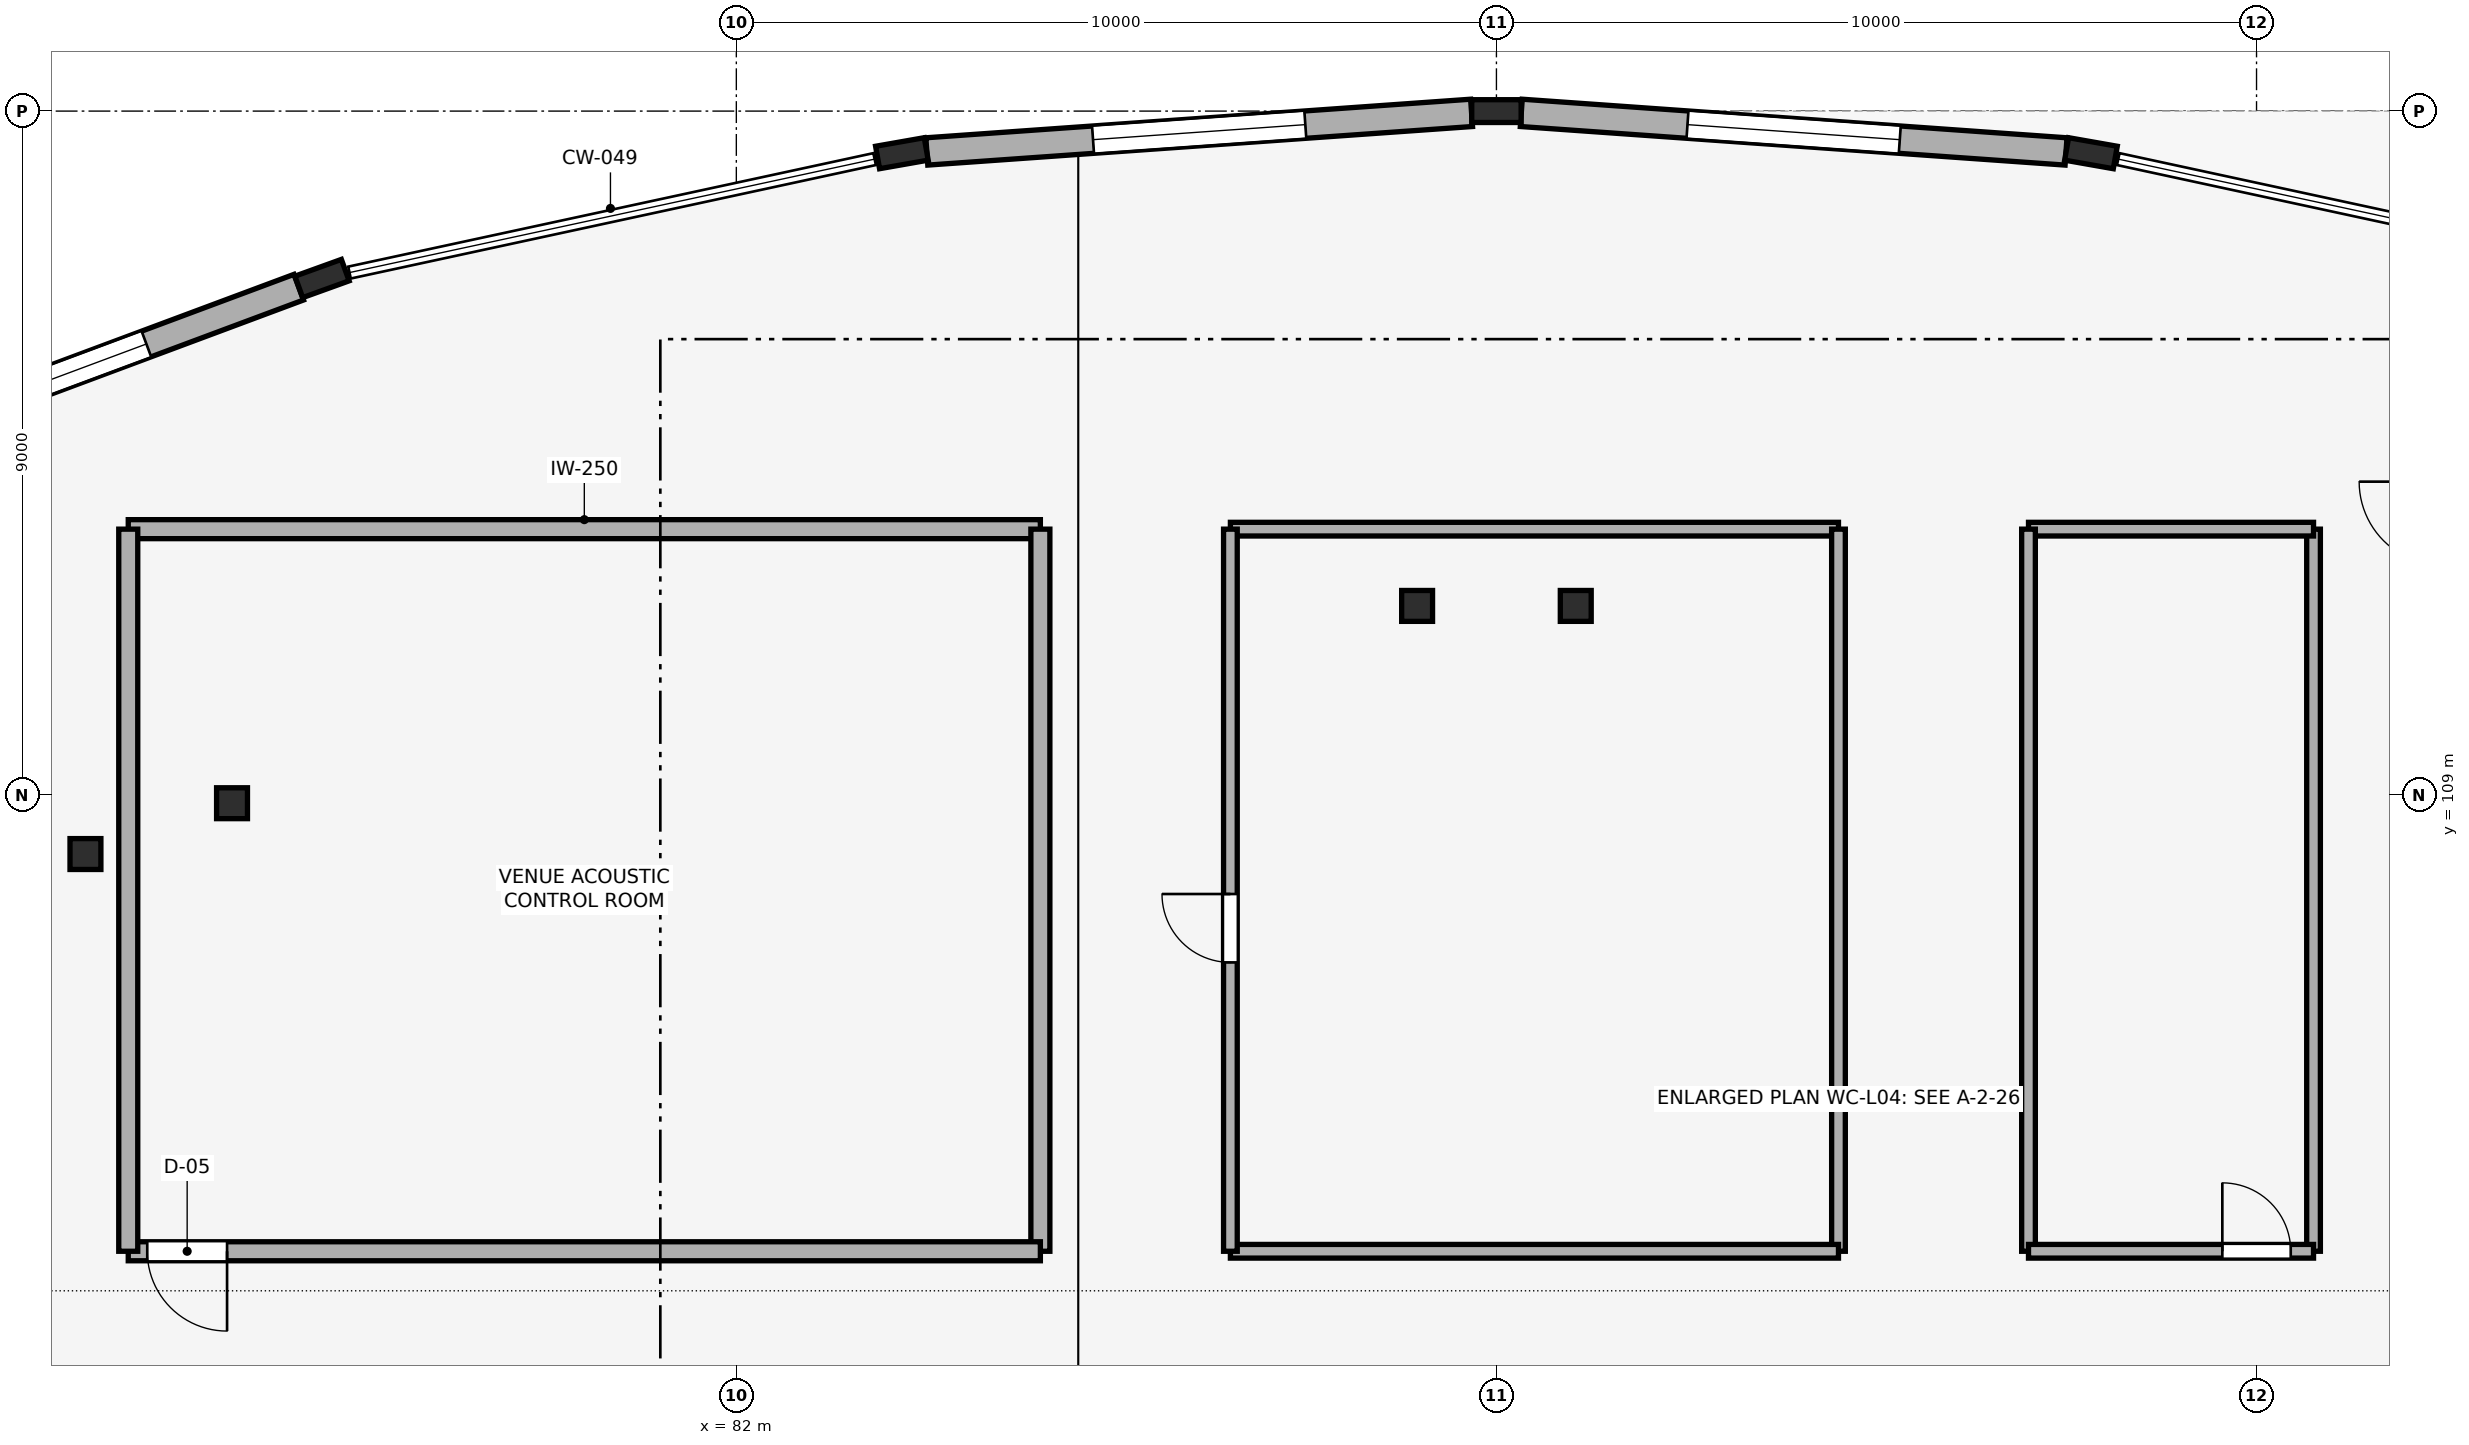
"""IFC4 building model, lengths in metres.
Left out: names, types, materials, properties, quantities, classifications, styles, units other than length and angle.
Written with IfcOpenShell. Run it as: python <this file> out.ifc"""

import sys

from ifc_helpers import new_model, si_unit, direction, frame, frame_2d, origin, origin_2d, place, context, subcontext, project, spatial, rectangle, hollow_circle, i_section, extrude, element, fill, save


model = new_model("IFC4")
c1 = context("Model", 3, precision=1e-05, world=origin(), true_north=direction((0.0, 1.0)))
c2 = subcontext(c1, "Body", "Model", "MODEL_VIEW")
j1 = project(units=[si_unit("LENGTHUNIT", "METRE"), si_unit("PLANEANGLEUNIT", "RADIAN")], contexts=[c1])
p1 = place(None, origin())
s1 = spatial("IfcSite", under=j1, at=p1, CompositionType="ELEMENT")
p2 = place(p1, origin())
s2 = spatial("IfcBuilding", under=s1, at=p2, CompositionType="ELEMENT")
p3 = place(p2, frame((0.0, 0.0, 19.5)))
s3 = spatial("IfcBuildingStorey", under=s2, at=p3, CompositionType="ELEMENT", Elevation=19.5)
for number, where, z_axis, x_axis in (
    (1, (99.822, 117.446, 0.0), (0.0, 0.0, 1.0), (0.173, 0.985, 0.0)),
    (2, (92.0, 118.0, 0.0), (0.0, 0.0, 1.0), (0.0, 1.0, 0.0)),
    (3, (84.178, 117.446, 0.0), (0.0, 0.0, 1.0), (-0.173, 0.985, 0.0)),
    (4, (76.549, 115.798, 0.0), (0.0, 0.0, 1.0), (-0.34, 0.941, 0.0)),
):
    element("IfcColumn", number, at=place(p3, frame(where, z_axis=z_axis, x_axis=x_axis)), inside=s3, PredefinedType="COLUMN", context=c2, shape_type="SweptSolid", body=[
        extrude(i_section(OverallWidth=0.3, OverallDepth=0.65, WebThickness=0.016, FlangeThickness=0.031, FilletRadius=0.027, at=origin_2d()), origin(), (0.0, 0.0, 1.0), 4.5),
    ])
for number, where, z_axis, x_axis in (
    (5, (93.044, 111.49, 0.0), (0.0, 0.0, 1.0), (1.0, 0.0, 0.0)),
    (6, (90.956, 111.49, 0.0), (0.0, 0.0, 1.0), (1.0, 0.0, 0.0)),
    (7, (75.365, 108.895, 0.0), (0.0, 0.0, 1.0), (1.0, 0.0, 0.0)),
    (8, (73.437, 108.226, 0.0), (0.0, 0.0, 1.0), (1.0, 0.0, 0.0)),
):
    element("IfcColumn", number, at=place(p3, frame(where, z_axis=z_axis, x_axis=x_axis)), inside=s3, PredefinedType="COLUMN", context=c2, shape_type="SweptSolid", body=[
        extrude(hollow_circle(Radius=0.203, WallThickness=0.016, at=origin_2d()), origin(), (0.0, 0.0, 1.0), 4.5),
    ])
p4 = place(p3, frame((69.611, 113.211, 0.0), z_axis=(0.0, 0.0, 1.0), x_axis=(0.937006422161, 0.349312130949, 0.0)))
e9 = element("IfcWall", 9, at=p4, inside=s3, PredefinedType="STANDARD", context=c2, shape_type="SweptSolid", body=[
    extrude(rectangle(XDim=7.078, YDim=0.36, at=frame_2d((3.539, 0.0))), origin(), (0.0, 0.0, 1.0), 3.562),
])
p5 = place(p4, frame((2.139, 0.0, 0.9)))
e10 = element("IfcOpeningElement", 10, at=p5, cuts=e9, PredefinedType="OPENING", context=c2, shape_type="SweptSolid", body=[
    extrude(rectangle(XDim=2.8, YDim=1.9, at=frame_2d((1.4, 0.95))), frame((0.0, 0.19, 0.0), z_axis=(0.0, -1.0, 0.0), x_axis=(1.0, 0.0, 0.0)), (0.0, 0.0, 1.0), 0.38),
])
p6 = place(p3, frame((84.506, 117.469, 0.0), z_axis=(0.0, 0.0, 1.0), x_axis=(0.99750163831, 0.070643340579, 0.0)))
e11 = element("IfcWall", 11, at=p6, inside=s3, PredefinedType="STANDARD", context=c2, shape_type="SweptSolid", body=[
    extrude(rectangle(XDim=7.185, YDim=0.36, at=frame_2d((3.593, 0.0))), origin(), (0.0, 0.0, 1.0), 3.562),
])
p7 = place(p6, frame((2.192, 0.0, 0.9)))
e12 = element("IfcOpeningElement", 12, at=p7, cuts=e11, PredefinedType="OPENING", context=c2, shape_type="SweptSolid", body=[
    extrude(rectangle(XDim=2.8, YDim=1.9, at=frame_2d((1.4, 0.95))), frame((0.0, 0.19, 0.0), z_axis=(0.0, -1.0, 0.0), x_axis=(1.0, 0.0, 0.0)), (0.0, 0.0, 1.0), 0.38),
])
p8 = place(p3, frame((92.327, 117.977, 0.0), z_axis=(0.0, 0.0, 1.0), x_axis=(0.99750163831, -0.070643340579, 0.0)))
e13 = element("IfcWall", 13, at=p8, inside=s3, PredefinedType="STANDARD", context=c2, shape_type="SweptSolid", body=[
    extrude(rectangle(XDim=7.185, YDim=0.36, at=frame_2d((3.593, 0.0))), origin(), (0.0, 0.0, 1.0), 3.562),
])
p9 = place(p8, frame((2.192, 0.0, 0.9)))
e14 = element("IfcOpeningElement", 14, at=p9, cuts=e13, PredefinedType="OPENING", context=c2, shape_type="SweptSolid", body=[
    extrude(rectangle(XDim=2.8, YDim=1.9, at=frame_2d((1.4, 0.95))), frame((0.0, 0.19, 0.0), z_axis=(0.0, -1.0, 0.0), x_axis=(1.0, 0.0, 0.0)), (0.0, 0.0, 1.0), 0.38),
])
p10 = place(p3, frame((74.0, 112.5, 0.0), z_axis=(0.0, 0.0, 1.0), x_axis=(1.0, 0.0, 0.0)))
e15 = element("IfcWall", 15, at=p10, inside=s3, PredefinedType="STANDARD", context=c2, shape_type="SweptSolid", body=[
    extrude(rectangle(XDim=12.0, YDim=0.25, at=frame_2d((6.0, 0.0))), origin(), (0.0, 0.0, 1.0), 4.25),
])
p11 = place(p3, frame((86.0, 112.5, 0.0), z_axis=(0.0, 0.0, 1.0), x_axis=(0.0, -1.0, 0.0)))
e16 = element("IfcWall", 16, at=p11, inside=s3, PredefinedType="STANDARD", context=c2, shape_type="SweptSolid", body=[
    extrude(rectangle(XDim=9.5, YDim=0.25, at=frame_2d((4.75, 0.0))), origin(), (0.0, 0.0, 1.0), 4.25),
])
p12 = place(p3, frame((86.0, 103.0, 0.0), z_axis=(0.0, 0.0, 1.0), x_axis=(-1.0, 0.0, 0.0)))
e17 = element("IfcWall", 17, at=p12, inside=s3, PredefinedType="STANDARD", context=c2, shape_type="SweptSolid", body=[
    extrude(rectangle(XDim=12.0, YDim=0.25, at=frame_2d((6.0, 0.0))), origin(), (0.0, 0.0, 1.0), 4.25),
])
p13 = place(p12, frame((10.7, 0.0, 0.0)))
e18 = element("IfcOpeningElement", 18, at=p13, cuts=e17, PredefinedType="OPENING", context=c2, shape_type="SweptSolid", body=[
    extrude(rectangle(XDim=1.05, YDim=2.15, at=frame_2d((0.525, 1.075))), frame((0.0, 0.135, 0.0), z_axis=(0.0, -1.0, 0.0), x_axis=(1.0, 0.0, 0.0)), (0.0, 0.0, 1.0), 0.27),
])
p14 = place(p3, frame((74.0, 103.0, 0.0), z_axis=(0.0, 0.0, 1.0), x_axis=(0.0, 1.0, 0.0)))
e19 = element("IfcWall", 19, at=p14, inside=s3, PredefinedType="STANDARD", context=c2, shape_type="SweptSolid", body=[
    extrude(rectangle(XDim=9.5, YDim=0.25, at=frame_2d((4.75, 0.0))), origin(), (0.0, 0.0, 1.0), 4.25),
])
p15 = place(p3, frame((88.5, 112.5, 0.0), z_axis=(0.0, 0.0, 1.0), x_axis=(1.0, 0.0, 0.0)))
e20 = element("IfcWall", 20, at=p15, inside=s3, PredefinedType="PARTITIONING", context=c2, shape_type="SweptSolid", body=[
    extrude(rectangle(XDim=8.0, YDim=0.18, at=frame_2d((4.0, 0.0))), origin(), (0.0, 0.0, 1.0), 4.25),
])
p16 = place(p3, frame((96.5, 112.5, 0.0), z_axis=(0.0, 0.0, 1.0), x_axis=(0.0, -1.0, 0.0)))
e21 = element("IfcWall", 21, at=p16, inside=s3, PredefinedType="PARTITIONING", context=c2, shape_type="SweptSolid", body=[
    extrude(rectangle(XDim=9.5, YDim=0.18, at=frame_2d((4.75, 0.0))), origin(), (0.0, 0.0, 1.0), 4.25),
])
p17 = place(p3, frame((96.5, 103.0, 0.0), z_axis=(0.0, 0.0, 1.0), x_axis=(-1.0, 0.0, 0.0)))
e22 = element("IfcWall", 22, at=p17, inside=s3, PredefinedType="PARTITIONING", context=c2, shape_type="SweptSolid", body=[
    extrude(rectangle(XDim=8.0, YDim=0.18, at=frame_2d((4.0, 0.0))), origin(), (0.0, 0.0, 1.0), 4.25),
])
p18 = place(p3, frame((88.5, 103.0, 0.0), z_axis=(0.0, 0.0, 1.0), x_axis=(0.0, 1.0, 0.0)))
e23 = element("IfcWall", 23, at=p18, inside=s3, PredefinedType="PARTITIONING", context=c2, shape_type="SweptSolid", body=[
    extrude(rectangle(XDim=9.5, YDim=0.18, at=frame_2d((4.75, 0.0))), origin(), (0.0, 0.0, 1.0), 4.25),
])
p19 = place(p18, frame((3.8, 0.0, 0.0)))
e24 = element("IfcOpeningElement", 24, at=p19, cuts=e23, PredefinedType="OPENING", context=c2, shape_type="SweptSolid", body=[
    extrude(rectangle(XDim=0.9, YDim=2.1, at=frame_2d((0.45, 1.05))), frame((0.0, 0.1, 0.0), z_axis=(0.0, -1.0, 0.0), x_axis=(1.0, 0.0, 0.0)), (0.0, 0.0, 1.0), 0.2),
])
p20 = place(p3, frame((102.75, 103.0, 0.0), z_axis=(0.0, 0.0, 1.0), x_axis=(0.0, 1.0, 0.0)))
e25 = element("IfcWall", 25, at=p20, inside=s3, PredefinedType="PARTITIONING", context=c2, shape_type="SweptSolid", body=[
    extrude(rectangle(XDim=9.5, YDim=0.18, at=frame_2d((4.75, 0.0))), origin(), (0.0, 0.0, 1.0), 4.25),
])
p21 = place(p3, frame((102.75, 112.5, 0.0), z_axis=(0.0, 0.0, 1.0), x_axis=(-1.0, 0.0, 0.0)))
e26 = element("IfcWall", 26, at=p21, inside=s3, PredefinedType="PARTITIONING", context=c2, shape_type="SweptSolid", body=[
    extrude(rectangle(XDim=3.75, YDim=0.18, at=frame_2d((1.875, 0.0))), origin(), (0.0, 0.0, 1.0), 4.25),
])
p22 = place(p3, frame((99.0, 112.5, 0.0), z_axis=(0.0, 0.0, 1.0), x_axis=(0.0, -1.0, 0.0)))
e27 = element("IfcWall", 27, at=p22, inside=s3, PredefinedType="PARTITIONING", context=c2, shape_type="SweptSolid", body=[
    extrude(rectangle(XDim=9.5, YDim=0.18, at=frame_2d((4.75, 0.0))), origin(), (0.0, 0.0, 1.0), 4.25),
])
p23 = place(p3, frame((99.0, 103.0, 0.0), z_axis=(0.0, 0.0, 1.0), x_axis=(1.0, 0.0, 0.0)))
e28 = element("IfcWall", 28, at=p23, inside=s3, PredefinedType="PARTITIONING", context=c2, shape_type="SweptSolid", body=[
    extrude(rectangle(XDim=3.75, YDim=0.18, at=frame_2d((1.875, 0.0))), origin(), (0.0, 0.0, 1.0), 4.25),
])
p24 = place(p23, frame((2.55, 0.0, 0.0)))
e29 = element("IfcOpeningElement", 29, at=p24, cuts=e28, PredefinedType="OPENING", context=c2, shape_type="SweptSolid", body=[
    extrude(rectangle(XDim=0.9, YDim=2.1, at=frame_2d((0.45, 1.05))), frame((0.0, 0.1, 0.0), z_axis=(0.0, -1.0, 0.0), x_axis=(1.0, 0.0, 0.0)), (0.0, 0.0, 1.0), 0.2),
])
p25 = place(p5, origin())
e30 = element("IfcWindow", 30, at=p25, inside=s3, PartitioningType="SINGLE_PANEL", PredefinedType="WINDOW", context=c2, shape_type="SweptSolid", body=[
    extrude(rectangle(XDim=2.8, YDim=1.9, at=frame_2d((1.4, 0.95))), frame((0.0, 0.03, 0.0), z_axis=(0.0, -1.0, 0.0), x_axis=(1.0, 0.0, 0.0)), (0.0, 0.0, 1.0), 0.06),
])
fill(e10, e30)
p26 = place(p7, origin())
e31 = element("IfcWindow", 31, at=p26, inside=s3, PartitioningType="SINGLE_PANEL", PredefinedType="WINDOW", context=c2, shape_type="SweptSolid", body=[
    extrude(rectangle(XDim=2.8, YDim=1.9, at=frame_2d((1.4, 0.95))), frame((0.0, 0.03, 0.0), z_axis=(0.0, -1.0, 0.0), x_axis=(1.0, 0.0, 0.0)), (0.0, 0.0, 1.0), 0.06),
])
fill(e12, e31)
p27 = place(p9, origin())
e32 = element("IfcWindow", 32, at=p27, inside=s3, PartitioningType="SINGLE_PANEL", PredefinedType="WINDOW", context=c2, shape_type="SweptSolid", body=[
    extrude(rectangle(XDim=2.8, YDim=1.9, at=frame_2d((1.4, 0.95))), frame((0.0, 0.03, 0.0), z_axis=(0.0, -1.0, 0.0), x_axis=(1.0, 0.0, 0.0)), (0.0, 0.0, 1.0), 0.06),
])
fill(e14, e32)
p28 = place(p13, origin())
e33 = element("IfcDoor", 33, at=p28, inside=s3, OperationType="SINGLE_SWING_LEFT", PredefinedType="DOOR", context=c2, shape_type="SweptSolid", body=[
    extrude(rectangle(XDim=1.05, YDim=2.15, at=frame_2d((0.525, 1.075))), frame((0.0, 0.025, 0.0), z_axis=(0.0, -1.0, 0.0), x_axis=(1.0, 0.0, 0.0)), (0.0, 0.0, 1.0), 0.05),
])
fill(e18, e33)
p29 = place(p19, origin())
e34 = element("IfcDoor", 34, at=p29, inside=s3, OperationType="SINGLE_SWING_RIGHT", PredefinedType="DOOR", context=c2, shape_type="SweptSolid", body=[
    extrude(rectangle(XDim=0.9, YDim=2.1, at=frame_2d((0.45, 1.05))), frame((0.0, 0.025, 0.0), z_axis=(0.0, -1.0, 0.0), x_axis=(1.0, 0.0, 0.0)), (0.0, 0.0, 1.0), 0.05),
])
fill(e24, e34)
p30 = place(p24, origin())
e35 = element("IfcDoor", 35, at=p30, inside=s3, OperationType="SINGLE_SWING_LEFT", PredefinedType="DOOR", context=c2, shape_type="SweptSolid", body=[
    extrude(rectangle(XDim=0.9, YDim=2.1, at=frame_2d((0.45, 1.05))), frame((0.0, 0.025, 0.0), z_axis=(0.0, -1.0, 0.0), x_axis=(1.0, 0.0, 0.0)), (0.0, 0.0, 1.0), 0.05),
])
fill(e29, e35)
save(model, sys.argv[1])
